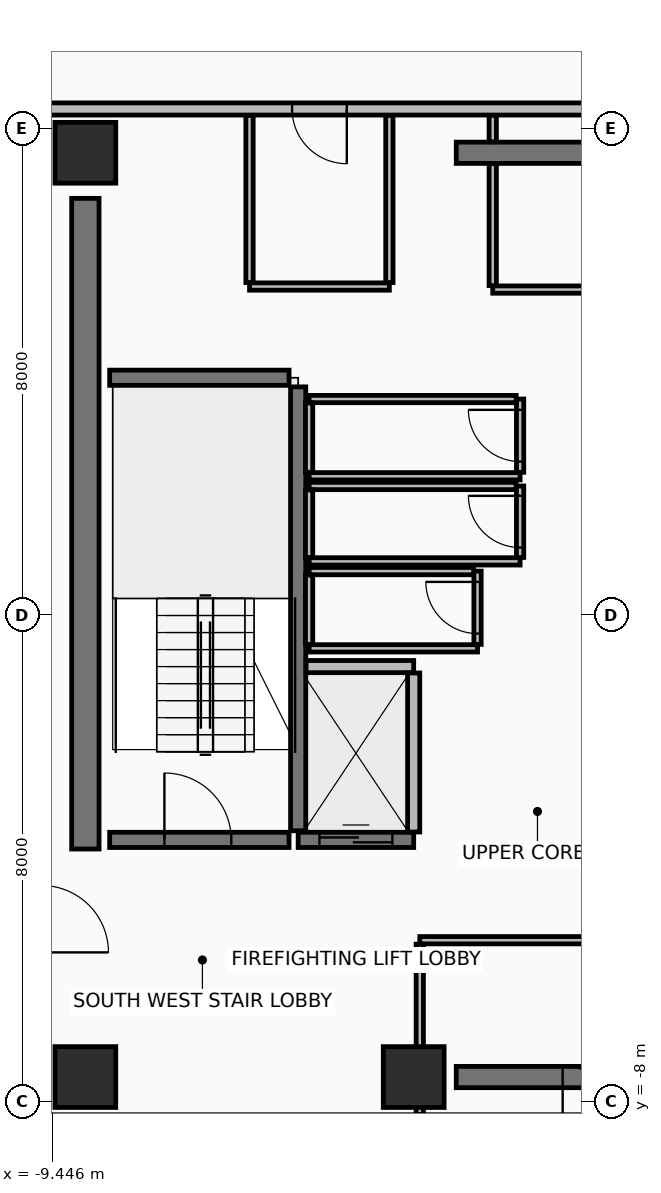
"""IFC4 building model, lengths in metres.
Left out: names, types, materials, properties, quantities, classifications, styles, units other than length and angle.
Written with IfcOpenShell. Run it as: python <this file> out.ifc"""

import sys

from ifc_helpers import new_model, si_unit, direction, frame, frame_2d, origin, origin_2d, place, context, subcontext, project, spatial, rectangle, extrude, element, fill, save


model = new_model("IFC4")
c1 = context("Model", 3, precision=1e-05, world=origin(), true_north=direction((0.0, 1.0)))
c2 = subcontext(c1, "Body", "Model", "MODEL_VIEW")
j1 = project(units=[si_unit("LENGTHUNIT", "METRE"), si_unit("PLANEANGLEUNIT", "RADIAN")], contexts=[c1])
p1 = place(None, origin())
s1 = spatial("IfcSite", under=j1, at=p1, CompositionType="ELEMENT")
p2 = place(p1, origin())
s2 = spatial("IfcBuilding", under=s1, at=p2, CompositionType="ELEMENT")
p3 = place(p2, frame((0.0, 0.0, 230.65)))
s3 = spatial("IfcBuildingStorey", under=s2, at=p3, CompositionType="ELEMENT", Elevation=230.65)
for number, where, z_axis, x_axis in (
    (1, (-8.9, -7.6, 0.0), (0.0, 0.0, 1.0), (1.0, 0.0, 0.0)),
    (2, (-3.5, -7.6, 0.0), (0.0, 0.0, 1.0), (1.0, 0.0, 0.0)),
    (3, (-8.9, 7.6, 0.0), (0.0, 0.0, 1.0), (1.0, 0.0, 0.0)),
):
    element("IfcColumn", number, at=place(p3, frame(where, z_axis=z_axis, x_axis=x_axis)), inside=s3, PredefinedType="COLUMN", context=c2, shape_type="SweptSolid", body=[
        extrude(rectangle(XDim=1.0, YDim=1.0, at=origin_2d()), origin(), (0.0, 0.0, 1.0), 3.6),
    ])
for number, where, z_axis, x_axis in (
    (4, (-2.8, -7.6, 0.0), (0.0, 0.0, 1.0), (1.0, 0.0, 0.0)),
    (5, (-2.8, 7.6, 0.0), (0.0, 0.0, 1.0), (1.0, 0.0, 0.0)),
):
    element("IfcWall", number, at=place(p3, frame(where, z_axis=z_axis, x_axis=x_axis)), inside=s3, PredefinedType="SHEAR", context=c2, shape_type="SweptSolid", body=[
        extrude(rectangle(XDim=5.38, YDim=0.35, at=frame_2d((2.69, 0.0))), origin(), (0.0, 0.0, 1.0), 3.42),
    ])
p4 = place(p3, frame((-8.9, -3.85, 0.0), z_axis=(0.0, 0.0, 1.0), x_axis=(0.0, 1.0, 0.0)))
e6 = element("IfcWall", 6, at=p4, inside=s3, PredefinedType="SHEAR", context=c2, shape_type="SweptSolid", body=[
    extrude(rectangle(XDim=10.7, YDim=0.45, at=frame_2d((5.35, 0.0))), origin(), (0.0, 0.0, 1.0), 3.42),
])
p5 = place(p3, frame((9.62, 8.32, 0.0), z_axis=(0.0, 0.0, 1.0), x_axis=(-1.0, 0.0, 0.0)))
e7 = element("IfcWall", 7, at=p5, inside=s3, PredefinedType="PARTITIONING", context=c2, shape_type="SweptSolid", body=[
    extrude(rectangle(XDim=19.24, YDim=0.2, at=frame_2d((9.62, 0.0))), origin(), (0.0, 0.0, 1.0), 2.915),
])
p6 = place(p5, frame((8.67, 0.0, 0.0)))
e8 = element("IfcOpeningElement", 8, at=p6, cuts=e7, PredefinedType="OPENING", context=c2, shape_type="SweptSolid", body=[
    extrude(rectangle(XDim=0.9, YDim=2.1, at=frame_2d((0.45, 1.05))), frame((0.0, 0.11, 0.0), z_axis=(0.0, -1.0, 0.0), x_axis=(1.0, 0.0, 0.0)), (0.0, 0.0, 1.0), 0.22),
])
p7 = place(p5, frame((14.22, 0.0, 0.0)))
e9 = element("IfcOpeningElement", 9, at=p7, cuts=e7, PredefinedType="OPENING", context=c2, shape_type="SweptSolid", body=[
    extrude(rectangle(XDim=0.9, YDim=2.1, at=frame_2d((0.45, 1.05))), frame((0.0, 0.11, 0.0), z_axis=(0.0, -1.0, 0.0), x_axis=(1.0, 0.0, 0.0)), (0.0, 0.0, 1.0), 0.22),
])
p8 = place(p3, frame((-5.4, -3.55, 0.0), z_axis=(0.0, 0.0, 1.0), x_axis=(0.0, 1.0, 0.0)))
e10 = element("IfcWall", 10, at=p8, inside=s3, PredefinedType="SHEAR", context=c2, shape_type="SweptSolid", body=[
    extrude(rectangle(XDim=7.3, YDim=0.25, at=frame_2d((3.65, 0.0))), origin(), (0.0, 0.0, 1.0), 3.42),
])
p9 = place(p3, frame((-8.5, -3.7, 0.0), z_axis=(0.0, 0.0, 1.0), x_axis=(1.0, 0.0, 0.0)))
e11 = element("IfcWall", 11, at=p9, inside=s3, PredefinedType="SHEAR", context=c2, shape_type="SweptSolid", body=[
    extrude(rectangle(XDim=2.95, YDim=0.25, at=frame_2d((1.475, 0.0))), origin(), (0.0, 0.0, 1.0), 3.42),
])
p10 = place(p9, frame((0.9, 0.0, 0.0)))
e12 = element("IfcOpeningElement", 12, at=p10, cuts=e11, PredefinedType="OPENING", context=c2, shape_type="SweptSolid", body=[
    extrude(rectangle(XDim=1.1, YDim=2.15, at=frame_2d((0.55, 1.075))), frame((0.0, 0.135, 0.0), z_axis=(0.0, -1.0, 0.0), x_axis=(1.0, 0.0, 0.0)), (0.0, 0.0, 1.0), 0.27),
])
p11 = place(p3, frame((-8.5, 3.9, 0.0), z_axis=(0.0, 0.0, 1.0), x_axis=(1.0, 0.0, 0.0)))
e13 = element("IfcWall", 13, at=p11, inside=s3, PredefinedType="SHEAR", context=c2, shape_type="SweptSolid", body=[
    extrude(rectangle(XDim=2.95, YDim=0.25, at=frame_2d((1.475, 0.0))), origin(), (0.0, 0.0, 1.0), 3.42),
])
p12 = place(p3, frame((-5.4, -3.7, 0.0), z_axis=(0.0, 0.0, 1.0), x_axis=(1.0, 0.0, 0.0)))
e14 = element("IfcWall", 14, at=p12, inside=s3, PredefinedType="SHEAR", context=c2, shape_type="SweptSolid", body=[
    extrude(rectangle(XDim=1.9, YDim=0.25, at=frame_2d((0.95, 0.0))), origin(), (0.0, 0.0, 1.0), 3.42),
])
p13 = place(p12, frame((0.35, 0.0, 0.0)))
e15 = element("IfcOpeningElement", 15, at=p13, cuts=e14, PredefinedType="OPENING", context=c2, shape_type="SweptSolid", body=[
    extrude(rectangle(XDim=1.2, YDim=2.2, at=frame_2d((0.6, 1.1))), frame((0.0, 0.135, 0.0), z_axis=(0.0, -1.0, 0.0), x_axis=(1.0, 0.0, 0.0)), (0.0, 0.0, 1.0), 0.27),
])
p14 = place(p3, frame((-5.27, -0.85, 0.0), z_axis=(0.0, 0.0, 1.0), x_axis=(1.0, 0.0, 0.0)))
e16 = element("IfcWall", 16, at=p14, inside=s3, PredefinedType="PARTITIONING", context=c2, shape_type="SweptSolid", body=[
    extrude(rectangle(XDim=1.77, YDim=0.2, at=frame_2d((0.885, 0.0))), origin(), (0.0, 0.0, 1.0), 3.42),
])
p15 = place(p3, frame((-3.5, -3.57, 0.0), z_axis=(0.0, 0.0, 1.0), x_axis=(0.0, 1.0, 0.0)))
e17 = element("IfcWall", 17, at=p15, inside=s3, PredefinedType="PARTITIONING", context=c2, shape_type="SweptSolid", body=[
    extrude(rectangle(XDim=2.615, YDim=0.2, at=frame_2d((1.308, 0.0))), origin(), (0.0, 0.0, 1.0), 3.42),
])
p16 = place(p3, frame((-5.22, 2.28, 0.0), z_axis=(0.0, 0.0, 1.0), x_axis=(1.0, 0.0, 0.0)))
e18 = element("IfcWall", 18, at=p16, inside=s3, PredefinedType="PARTITIONING", context=c2, shape_type="SweptSolid", body=[
    extrude(rectangle(XDim=3.47, YDim=0.12, at=frame_2d((1.735, 0.0))), origin(), (0.0, 0.0, 1.0), 3.42),
])
p17 = place(p3, frame((-1.75, 2.345, 0.0), z_axis=(0.0, 0.0, 1.0), x_axis=(0.0, 1.0, 0.0)))
e19 = element("IfcWall", 19, at=p17, inside=s3, PredefinedType="PARTITIONING", context=c2, shape_type="SweptSolid", body=[
    extrude(rectangle(XDim=1.205, YDim=0.12, at=frame_2d((0.603, 0.0))), origin(), (0.0, 0.0, 1.0), 3.42),
])
p18 = place(p17, frame((0.177, 0.0, 0.0)))
e20 = element("IfcOpeningElement", 20, at=p18, cuts=e19, PredefinedType="OPENING", context=c2, shape_type="SweptSolid", body=[
    extrude(rectangle(XDim=0.85, YDim=2.1, at=frame_2d((0.425, 1.05))), frame((0.0, 0.07, 0.0), z_axis=(0.0, -1.0, 0.0), x_axis=(1.0, 0.0, 0.0)), (0.0, 0.0, 1.0), 0.14),
])
p19 = place(p3, frame((-1.815, 3.55, 0.0), z_axis=(0.0, 0.0, 1.0), x_axis=(-1.0, 0.0, 0.0)))
e21 = element("IfcWall", 21, at=p19, inside=s3, PredefinedType="PARTITIONING", context=c2, shape_type="SweptSolid", body=[
    extrude(rectangle(XDim=3.405, YDim=0.12, at=frame_2d((1.703, 0.0))), origin(), (0.0, 0.0, 1.0), 3.42),
])
p20 = place(p3, frame((-5.22, 3.485, 0.0), z_axis=(0.0, 0.0, 1.0), x_axis=(0.0, -1.0, 0.0)))
e22 = element("IfcWall", 22, at=p20, inside=s3, PredefinedType="PARTITIONING", context=c2, shape_type="SweptSolid", body=[
    extrude(rectangle(XDim=1.14, YDim=0.12, at=frame_2d((0.57, 0.0))), origin(), (0.0, 0.0, 1.0), 3.42),
])
p21 = place(p3, frame((-5.22, 0.88, 0.0), z_axis=(0.0, 0.0, 1.0), x_axis=(1.0, 0.0, 0.0)))
e23 = element("IfcWall", 23, at=p21, inside=s3, PredefinedType="PARTITIONING", context=c2, shape_type="SweptSolid", body=[
    extrude(rectangle(XDim=3.47, YDim=0.12, at=frame_2d((1.735, 0.0))), origin(), (0.0, 0.0, 1.0), 3.42),
])
p22 = place(p3, frame((-1.75, 0.945, 0.0), z_axis=(0.0, 0.0, 1.0), x_axis=(0.0, 1.0, 0.0)))
e24 = element("IfcWall", 24, at=p22, inside=s3, PredefinedType="PARTITIONING", context=c2, shape_type="SweptSolid", body=[
    extrude(rectangle(XDim=1.175, YDim=0.12, at=frame_2d((0.587, 0.0))), origin(), (0.0, 0.0, 1.0), 3.42),
])
p23 = place(p22, frame((0.163, 0.0, 0.0)))
e25 = element("IfcOpeningElement", 25, at=p23, cuts=e24, PredefinedType="OPENING", context=c2, shape_type="SweptSolid", body=[
    extrude(rectangle(XDim=0.85, YDim=2.1, at=frame_2d((0.425, 1.05))), frame((0.0, 0.07, 0.0), z_axis=(0.0, -1.0, 0.0), x_axis=(1.0, 0.0, 0.0)), (0.0, 0.0, 1.0), 0.14),
])
p24 = place(p3, frame((-1.815, 2.12, 0.0), z_axis=(0.0, 0.0, 1.0), x_axis=(-1.0, 0.0, 0.0)))
e26 = element("IfcWall", 26, at=p24, inside=s3, PredefinedType="PARTITIONING", context=c2, shape_type="SweptSolid", body=[
    extrude(rectangle(XDim=3.405, YDim=0.12, at=frame_2d((1.703, 0.0))), origin(), (0.0, 0.0, 1.0), 3.42),
])
p25 = place(p3, frame((-5.22, 2.055, 0.0), z_axis=(0.0, 0.0, 1.0), x_axis=(0.0, -1.0, 0.0)))
e27 = element("IfcWall", 27, at=p25, inside=s3, PredefinedType="PARTITIONING", context=c2, shape_type="SweptSolid", body=[
    extrude(rectangle(XDim=1.11, YDim=0.12, at=frame_2d((0.555, 0.0))), origin(), (0.0, 0.0, 1.0), 3.42),
])
p26 = place(p3, frame((-5.22, -0.55, 0.0), z_axis=(0.0, 0.0, 1.0), x_axis=(1.0, 0.0, 0.0)))
e28 = element("IfcWall", 28, at=p26, inside=s3, PredefinedType="PARTITIONING", context=c2, shape_type="SweptSolid", body=[
    extrude(rectangle(XDim=2.77, YDim=0.12, at=frame_2d((1.385, 0.0))), origin(), (0.0, 0.0, 1.0), 3.42),
])
p27 = place(p3, frame((-2.45, -0.485, 0.0), z_axis=(0.0, 0.0, 1.0), x_axis=(0.0, 1.0, 0.0)))
e29 = element("IfcWall", 29, at=p27, inside=s3, PredefinedType="PARTITIONING", context=c2, shape_type="SweptSolid", body=[
    extrude(rectangle(XDim=1.205, YDim=0.12, at=frame_2d((0.603, 0.0))), origin(), (0.0, 0.0, 1.0), 3.42),
])
p28 = place(p27, frame((0.178, 0.0, 0.0)))
e30 = element("IfcOpeningElement", 30, at=p28, cuts=e29, PredefinedType="OPENING", context=c2, shape_type="SweptSolid", body=[
    extrude(rectangle(XDim=0.85, YDim=2.1, at=frame_2d((0.425, 1.05))), frame((0.0, 0.07, 0.0), z_axis=(0.0, -1.0, 0.0), x_axis=(1.0, 0.0, 0.0)), (0.0, 0.0, 1.0), 0.14),
])
p29 = place(p3, frame((-2.515, 0.72, 0.0), z_axis=(0.0, 0.0, 1.0), x_axis=(-1.0, 0.0, 0.0)))
e31 = element("IfcWall", 31, at=p29, inside=s3, PredefinedType="PARTITIONING", context=c2, shape_type="SweptSolid", body=[
    extrude(rectangle(XDim=2.705, YDim=0.12, at=frame_2d((1.353, 0.0))), origin(), (0.0, 0.0, 1.0), 3.42),
])
p30 = place(p3, frame((-5.22, 0.655, 0.0), z_axis=(0.0, 0.0, 1.0), x_axis=(0.0, -1.0, 0.0)))
e32 = element("IfcWall", 32, at=p30, inside=s3, PredefinedType="PARTITIONING", context=c2, shape_type="SweptSolid", body=[
    extrude(rectangle(XDim=1.14, YDim=0.12, at=frame_2d((0.57, 0.0))), origin(), (0.0, 0.0, 1.0), 3.42),
])
p31 = place(p3, frame((2.135, -5.35, 0.0), z_axis=(0.0, 0.0, 1.0), x_axis=(-1.0, 0.0, 0.0)))
e33 = element("IfcWall", 33, at=p31, inside=s3, PredefinedType="PARTITIONING", context=c2, shape_type="SweptSolid", body=[
    extrude(rectangle(XDim=5.535, YDim=0.12, at=frame_2d((2.768, 0.0))), origin(), (0.0, 0.0, 1.0), 2.715),
])
p32 = place(p3, frame((-3.4, -5.415, 0.0), z_axis=(0.0, 0.0, 1.0), x_axis=(0.0, -1.0, 0.0)))
e34 = element("IfcWall", 34, at=p32, inside=s3, PredefinedType="PARTITIONING", context=c2, shape_type="SweptSolid", body=[
    extrude(rectangle(XDim=2.8, YDim=0.12, at=frame_2d((1.4, 0.0))), origin(), (0.0, 0.0, 1.0), 2.715),
])
p33 = place(p3, frame((-2.2, 5.35, 0.0), z_axis=(0.0, 0.0, 1.0), x_axis=(1.0, 0.0, 0.0)))
e35 = element("IfcWall", 35, at=p33, inside=s3, PredefinedType="PARTITIONING", context=c2, shape_type="SweptSolid", body=[
    extrude(rectangle(XDim=5.4, YDim=0.12, at=frame_2d((2.7, 0.0))), origin(), (0.0, 0.0, 1.0), 2.715),
])
p34 = place(p3, frame((-2.2, 8.215, 0.0), z_axis=(0.0, 0.0, 1.0), x_axis=(0.0, -1.0, 0.0)))
e36 = element("IfcWall", 36, at=p34, inside=s3, PredefinedType="PARTITIONING", context=c2, shape_type="SweptSolid", body=[
    extrude(rectangle(XDim=0.435, YDim=0.12, at=frame_2d((0.218, 0.0))), origin(), (0.0, 0.0, 1.0), 2.715),
])
p35 = place(p3, frame((-2.2, 7.42, 0.0), z_axis=(0.0, 0.0, 1.0), x_axis=(0.0, -1.0, 0.0)))
e37 = element("IfcWall", 37, at=p35, inside=s3, PredefinedType="PARTITIONING", context=c2, shape_type="SweptSolid", body=[
    extrude(rectangle(XDim=2.005, YDim=0.12, at=frame_2d((1.002, 0.0))), origin(), (0.0, 0.0, 1.0), 2.715),
])
p36 = place(p3, frame((-6.2, 5.4, 0.0), z_axis=(0.0, 0.0, 1.0), x_axis=(1.0, 0.0, 0.0)))
e38 = element("IfcWall", 38, at=p36, inside=s3, PredefinedType="PARTITIONING", context=c2, shape_type="SweptSolid", body=[
    extrude(rectangle(XDim=2.3, YDim=0.12, at=frame_2d((1.15, 0.0))), origin(), (0.0, 0.0, 1.0), 3.42),
])
for number, where, z_axis, x_axis in (
    (39, (-3.9, 5.465, 0.0), (0.0, 0.0, 1.0), (0.0, 1.0, 0.0)),
    (40, (-6.2, 8.215, 0.0), (0.0, 0.0, 1.0), (0.0, -1.0, 0.0)),
):
    element("IfcWall", number, at=place(p3, frame(where, z_axis=z_axis, x_axis=x_axis)), inside=s3, PredefinedType="PARTITIONING", context=c2, shape_type="SweptSolid", body=[
        extrude(rectangle(XDim=2.75, YDim=0.12, at=frame_2d((1.375, 0.0))), origin(), (0.0, 0.0, 1.0), 2.715),
    ])
p37 = place(p10, origin())
e41 = element("IfcDoor", 41, at=p37, inside=s3, OperationType="SINGLE_SWING_LEFT", PredefinedType="DOOR", context=c2, shape_type="SweptSolid", body=[
    extrude(rectangle(XDim=1.1, YDim=2.15, at=frame_2d((0.55, 1.075))), frame((0.0, 0.025, 0.0), z_axis=(0.0, -1.0, 0.0), x_axis=(1.0, 0.0, 0.0)), (0.0, 0.0, 1.0), 0.05),
])
fill(e12, e41)
p38 = place(p13, origin())
e42 = element("IfcDoor", 42, at=p38, inside=s3, OperationType="SLIDING_TO_RIGHT", PredefinedType="DOOR", context=c2, shape_type="SweptSolid", body=[
    extrude(rectangle(XDim=1.2, YDim=2.2, at=frame_2d((0.6, 1.1))), frame((0.0, 0.025, 0.0), z_axis=(0.0, -1.0, 0.0), x_axis=(1.0, 0.0, 0.0)), (0.0, 0.0, 1.0), 0.05),
])
fill(e15, e42)
p39 = place(p18, frame((0.85, 0.0, 0.0), z_axis=(0.0, 0.0, 1.0), x_axis=(-1.0, 0.0, 0.0)))
e43 = element("IfcDoor", 43, at=p39, inside=s3, OperationType="SINGLE_SWING_RIGHT", PredefinedType="DOOR", context=c2, shape_type="SweptSolid", body=[
    extrude(rectangle(XDim=0.85, YDim=2.1, at=frame_2d((0.425, 1.05))), frame((0.0, 0.025, 0.0), z_axis=(0.0, -1.0, 0.0), x_axis=(1.0, 0.0, 0.0)), (0.0, 0.0, 1.0), 0.05),
])
fill(e20, e43)
p40 = place(p23, frame((0.85, 0.0, 0.0), z_axis=(0.0, 0.0, 1.0), x_axis=(-1.0, 0.0, 0.0)))
e44 = element("IfcDoor", 44, at=p40, inside=s3, OperationType="SINGLE_SWING_RIGHT", PredefinedType="DOOR", context=c2, shape_type="SweptSolid", body=[
    extrude(rectangle(XDim=0.85, YDim=2.1, at=frame_2d((0.425, 1.05))), frame((0.0, 0.025, 0.0), z_axis=(0.0, -1.0, 0.0), x_axis=(1.0, 0.0, 0.0)), (0.0, 0.0, 1.0), 0.05),
])
fill(e25, e44)
p41 = place(p28, frame((0.85, 0.0, 0.0), z_axis=(0.0, 0.0, 1.0), x_axis=(-1.0, 0.0, 0.0)))
e45 = element("IfcDoor", 45, at=p41, inside=s3, OperationType="SINGLE_SWING_RIGHT", PredefinedType="DOOR", context=c2, shape_type="SweptSolid", body=[
    extrude(rectangle(XDim=0.85, YDim=2.1, at=frame_2d((0.425, 1.05))), frame((0.0, 0.025, 0.0), z_axis=(0.0, -1.0, 0.0), x_axis=(1.0, 0.0, 0.0)), (0.0, 0.0, 1.0), 0.05),
])
fill(e30, e45)
p42 = place(p7, origin())
e46 = element("IfcDoor", 46, at=p42, inside=s3, OperationType="SINGLE_SWING_LEFT", PredefinedType="DOOR", context=c2, shape_type="SweptSolid", body=[
    extrude(rectangle(XDim=0.9, YDim=2.1, at=frame_2d((0.45, 1.05))), frame((0.0, 0.025, 0.0), z_axis=(0.0, -1.0, 0.0), x_axis=(1.0, 0.0, 0.0)), (0.0, 0.0, 1.0), 0.05),
])
fill(e9, e46)
save(model, sys.argv[1])
